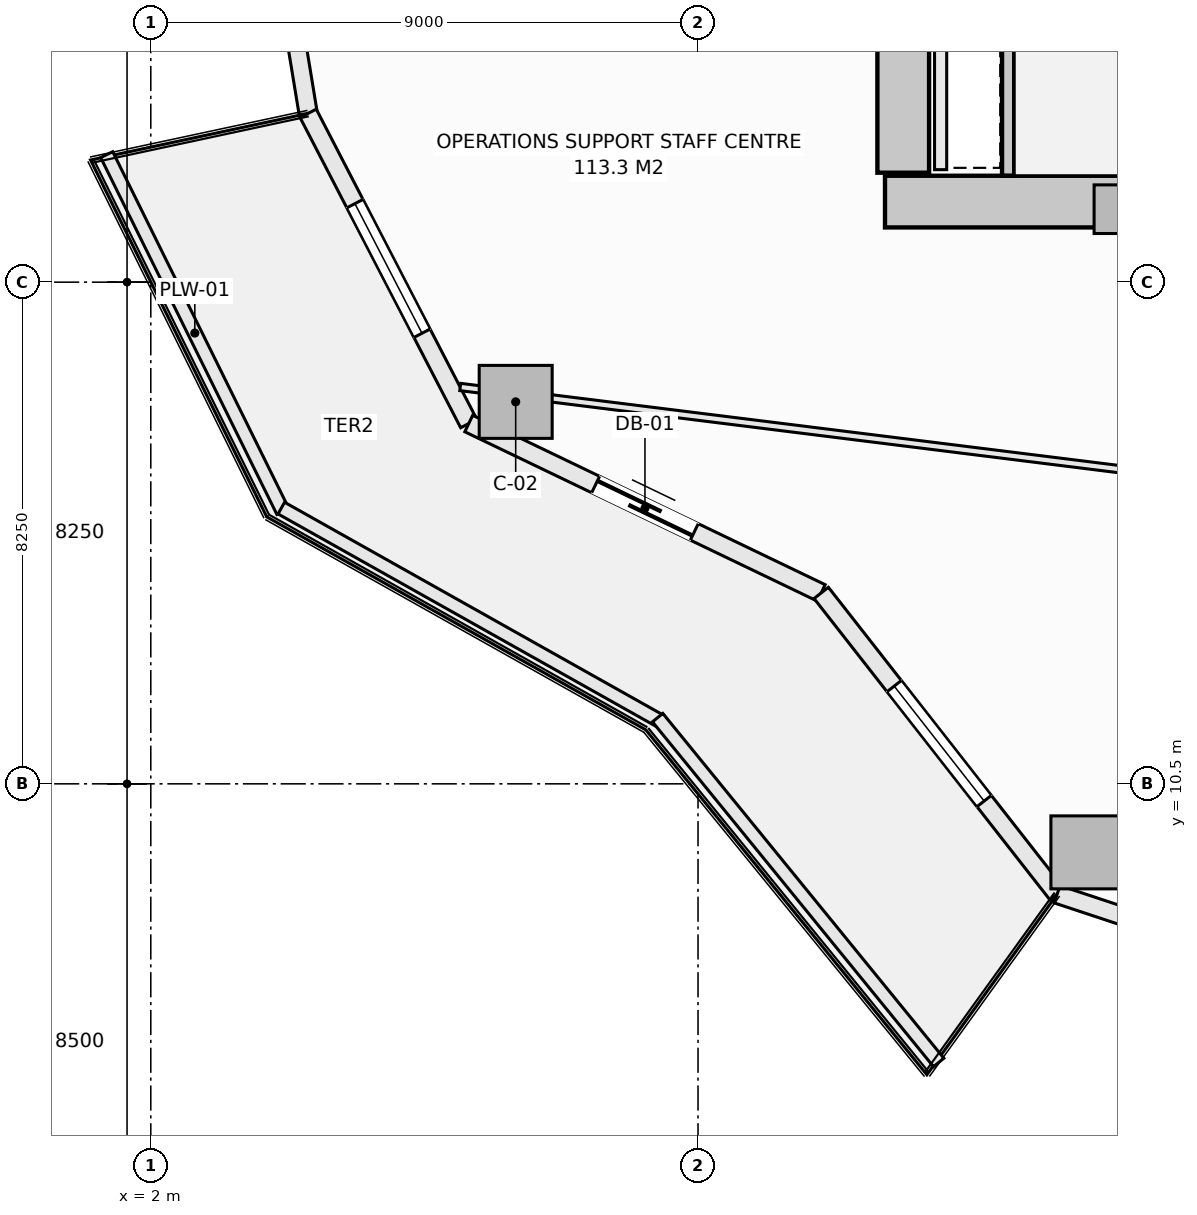
"""IFC4 building model, lengths in metres.
Left out: names, types, materials, properties, quantities, classifications, styles, units other than length and angle.
Written with IfcOpenShell. Run it as: python <this file> out.ifc"""

import sys

from ifc_helpers import new_model, si_unit, direction, frame, frame_2d, origin, origin_2d, place, context, subcontext, project, spatial, rectangle, extrude, element, fill, save


model = new_model("IFC4")
c1 = context("Model", 3, precision=1e-05, world=origin(), true_north=direction((0.0, 1.0)))
c2 = subcontext(c1, "Body", "Model", "MODEL_VIEW")
j1 = project(units=[si_unit("LENGTHUNIT", "METRE"), si_unit("PLANEANGLEUNIT", "RADIAN")], contexts=[c1])
p1 = place(None, origin())
s1 = spatial("IfcSite", under=j1, at=p1, CompositionType="ELEMENT")
p2 = place(p1, origin())
s2 = spatial("IfcBuilding", under=s1, at=p2, CompositionType="ELEMENT")
p3 = place(p2, frame((0.0, 0.0, 80.4)))
s3 = spatial("IfcBuildingStorey", under=s2, at=p3, CompositionType="ELEMENT", Elevation=80.4)
p4 = place(p3, frame((14.075, 20.075, -0.28), z_axis=(0.0, 0.0, 1.0), x_axis=(1.0, 0.0, 0.0)))
e1 = element("IfcWall", 1, at=p4, inside=s3, PredefinedType="SHEAR", context=c2, shape_type="SweptSolid", body=[
    extrude(rectangle(XDim=13.85, YDim=0.85, at=frame_2d((6.925, 0.0))), origin(), (0.0, 0.0, 1.0), 3.85),
])
p5 = place(p3, frame((14.375, 20.55, -0.28), z_axis=(0.0, 0.0, 1.0), x_axis=(0.0, 1.0, 0.0)))
e2 = element("IfcWall", 2, at=p5, inside=s3, PredefinedType="SHEAR", context=c2, shape_type="SweptSolid", body=[
    extrude(rectangle(XDim=12.9, YDim=0.85, at=frame_2d((6.45, 0.0))), origin(), (0.0, 0.0, 1.0), 3.85),
])
for number, where, z_axis, x_axis in (
    (3, (8.001, 16.781, -0.28), (0.0, 0.0, 1.0), (1.0, 0.0, 0.0)),
    (4, (17.404, 9.373, -0.28), (0.0, 0.0, 1.0), (1.0, 0.0, 0.0)),
):
    element("IfcColumn", number, at=place(p3, frame(where, z_axis=z_axis, x_axis=x_axis)), inside=s3, PredefinedType="COLUMN", context=c2, shape_type="SweptSolid", body=[
        extrude(rectangle(XDim=1.2, YDim=1.2, at=origin_2d()), origin(), (0.0, 0.0, 1.0), 3.85),
    ])
p6 = place(p3, frame((17.914, 19.95, -0.28), z_axis=(0.0, 0.0, 1.0), x_axis=(1.0, 0.0, 0.0)))
e5 = element("IfcColumn", 5, at=p6, inside=s3, PredefinedType="PILASTER", context=c2, shape_type="SweptSolid", body=[
    extrude(rectangle(XDim=0.8, YDim=0.8, at=origin_2d()), origin(), (0.0, 0.0, 1.0), 3.85),
])
p7 = place(p3, frame((3.688, 27.0, 0.0), z_axis=(0.0, 0.0, 1.0), x_axis=(0.162386212206, -0.986727276447, 0.0)))
e6 = element("IfcWall", 6, at=p7, inside=s3, PredefinedType="SOLIDWALL", context=c2, shape_type="SweptSolid", body=[
    extrude(rectangle(XDim=5.548, YDim=0.3, at=frame_2d((2.774, 0.0))), origin(), (0.0, 0.0, 1.0), 3.093),
])
p8 = place(p7, frame((2.05, 0.0, 0.85)))
e7 = element("IfcOpeningElement", 7, at=p8, cuts=e6, PredefinedType="OPENING", context=c2, shape_type="SweptSolid", body=[
    extrude(rectangle(XDim=2.4, YDim=1.9, at=frame_2d((1.2, 0.95))), frame((0.0, 0.16, 0.0), z_axis=(0.0, -1.0, 0.0), x_axis=(1.0, 0.0, 0.0)), (0.0, 0.0, 1.0), 0.32),
])
p9 = place(p3, frame((4.588, 21.526, 0.0), z_axis=(0.0, 0.0, 1.0), x_axis=(0.459800981414, -0.888021991558, 0.0)))
e8 = element("IfcWall", 8, at=p9, inside=s3, PredefinedType="SOLIDWALL", context=c2, shape_type="SweptSolid", body=[
    extrude(rectangle(XDim=5.744, YDim=0.3, at=frame_2d((2.872, 0.0))), origin(), (0.0, 0.0, 1.0), 3.093),
])
p10 = place(p9, frame((1.672, 0.0, 0.85)))
e9 = element("IfcOpeningElement", 9, at=p10, cuts=e8, PredefinedType="OPENING", context=c2, shape_type="SweptSolid", body=[
    extrude(rectangle(XDim=2.4, YDim=1.9, at=frame_2d((1.2, 0.95))), frame((0.0, 0.16, 0.0), z_axis=(0.0, -1.0, 0.0), x_axis=(1.0, 0.0, 0.0)), (0.0, 0.0, 1.0), 0.32),
])
p11 = place(p3, frame((7.229, 16.425, 0.0), z_axis=(0.0, 0.0, 1.0), x_axis=(0.901354747727, -0.433081538224, 0.0)))
e10 = element("IfcWall", 10, at=p11, inside=s3, PredefinedType="SOLIDWALL", context=c2, shape_type="SweptSolid", body=[
    extrude(rectangle(XDim=6.431, YDim=0.3, at=frame_2d((3.215, 0.0))), origin(), (0.0, 0.0, 1.0), 3.093),
])
p12 = place(p11, frame((2.315, 0.0, 0.0)))
e11 = element("IfcOpeningElement", 11, at=p12, cuts=e10, PredefinedType="OPENING", context=c2, shape_type="SweptSolid", body=[
    extrude(rectangle(XDim=1.8, YDim=2.25, at=frame_2d((0.9, 1.125))), frame((0.0, 0.16, 0.0), z_axis=(0.0, -1.0, 0.0), x_axis=(1.0, 0.0, 0.0)), (0.0, 0.0, 1.0), 0.32),
])
p13 = place(p3, frame((13.026, 13.64, 0.0), z_axis=(0.0, 0.0, 1.0), x_axis=(0.616434798832, -0.78740595552, 0.0)))
e12 = element("IfcWall", 12, at=p13, inside=s3, PredefinedType="SOLIDWALL", context=c2, shape_type="SweptSolid", body=[
    extrude(rectangle(XDim=6.294, YDim=0.3, at=frame_2d((3.147, 0.0))), origin(), (0.0, 0.0, 1.0), 3.093),
])
p14 = place(p13, frame((1.947, 0.0, 0.85)))
e13 = element("IfcOpeningElement", 13, at=p14, cuts=e12, PredefinedType="OPENING", context=c2, shape_type="SweptSolid", body=[
    extrude(rectangle(XDim=2.4, YDim=1.9, at=frame_2d((1.2, 0.95))), frame((0.0, 0.16, 0.0), z_axis=(0.0, -1.0, 0.0), x_axis=(1.0, 0.0, 0.0)), (0.0, 0.0, 1.0), 0.32),
])
p15 = place(p3, frame((16.906, 8.684, 0.0), z_axis=(0.0, 0.0, 1.0), x_axis=(0.949245153629, -0.314537181127, 0.0)))
e14 = element("IfcWall", 14, at=p15, inside=s3, PredefinedType="SOLIDWALL", context=c2, shape_type="SweptSolid", body=[
    extrude(rectangle(XDim=6.717, YDim=0.3, at=frame_2d((3.358, 0.0))), origin(), (0.0, 0.0, 1.0), 3.093),
])
p16 = place(p15, frame((2.159, 0.0, 0.85)))
e15 = element("IfcOpeningElement", 15, at=p16, cuts=e14, PredefinedType="OPENING", context=c2, shape_type="SweptSolid", body=[
    extrude(rectangle(XDim=2.4, YDim=1.9, at=frame_2d((1.2, 0.95))), frame((0.0, 0.16, 0.0), z_axis=(0.0, -1.0, 0.0), x_axis=(1.0, 0.0, 0.0)), (0.0, 0.0, 1.0), 0.32),
])
p17 = place(p3, frame((1.275, 20.847, 0.0), z_axis=(0.0, 0.0, 1.0), x_axis=(0.442686636348, -0.89667638644, 0.0)))
e16 = element("IfcWall", 16, at=p17, inside=s3, PredefinedType="PARAPET", context=c2, shape_type="SweptSolid", body=[
    extrude(rectangle(XDim=6.545, YDim=0.22, at=frame_2d((3.272, 0.0))), origin(), (0.0, 0.0, 1.0), 0.52),
])
p18 = place(p3, frame((4.147, 15.034, 0.0), z_axis=(0.0, 0.0, 1.0), x_axis=(0.871775109335, -0.489906275468, 0.0)))
e17 = element("IfcWall", 17, at=p18, inside=s3, PredefinedType="PARAPET", context=c2, shape_type="SweptSolid", body=[
    extrude(rectangle(XDim=7.152, YDim=0.22, at=frame_2d((3.576, 0.0))), origin(), (0.0, 0.0, 1.0), 0.52),
])
p19 = place(p3, frame((10.336, 11.589, 0.0), z_axis=(0.0, 0.0, 1.0), x_axis=(0.631819273026, -0.775115737315, 0.0)))
e18 = element("IfcWall", 18, at=p19, inside=s3, PredefinedType="PARAPET", context=c2, shape_type="SweptSolid", body=[
    extrude(rectangle(XDim=7.316, YDim=0.22, at=frame_2d((3.658, 0.0))), origin(), (0.0, 0.0, 1.0), 0.52),
])
p20 = place(p3, frame((16.1, 20.502, -0.28), z_axis=(0.0, 0.0, 1.0), x_axis=(0.0, 1.0, 0.0)))
e19 = element("IfcWall", 19, at=p20, inside=s3, PredefinedType="SHEAR", context=c2, shape_type="SweptSolid", body=[
    extrude(rectangle(XDim=3.036, YDim=0.2, at=frame_2d((1.518, 0.0))), origin(), (0.0, 0.0, 1.0), 3.85),
])
p21 = place(p3, frame((14.99, 20.6, 0.0), z_axis=(0.0, 0.0, 1.0), x_axis=(0.0, 1.0, 0.0)))
e20 = element("IfcWall", 20, at=p21, inside=s3, PredefinedType="SOLIDWALL", context=c2, shape_type="SweptSolid", body=[
    extrude(rectangle(XDim=2.85, YDim=0.2, at=frame_2d((1.425, 0.0))), origin(), (0.0, 0.0, 1.0), 3.57),
])
p22 = place(p3, frame((7.089, 17.026, 0.0), z_axis=(0.0, 0.0, 1.0), x_axis=(0.992316064114, -0.123728852337, 0.0)))
e21 = element("IfcWall", 21, at=p22, inside=s3, PredefinedType="PARTITIONING", context=c2, shape_type="SweptSolid", body=[
    extrude(rectangle(XDim=20.138, YDim=0.12, at=frame_2d((10.069, 0.0))), origin(), (0.0, 0.0, 1.0), 3.205),
])
p23 = place(p10, origin())
e22 = element("IfcWindow", 22, at=p23, inside=s3, PartitioningType="SINGLE_PANEL", PredefinedType="WINDOW", context=c2, shape_type="SweptSolid", body=[
    extrude(rectangle(XDim=2.4, YDim=1.9, at=frame_2d((1.2, 0.95))), frame((0.0, 0.03, 0.0), z_axis=(0.0, -1.0, 0.0), x_axis=(1.0, 0.0, 0.0)), (0.0, 0.0, 1.0), 0.06),
])
fill(e9, e22)
p24 = place(p12, frame((1.8, 0.0, 0.0), z_axis=(0.0, 0.0, 1.0), x_axis=(-1.0, 0.0, 0.0)))
e23 = element("IfcDoor", 23, at=p24, inside=s3, OperationType="SLIDING_TO_LEFT", PredefinedType="DOOR", context=c2, shape_type="SweptSolid", body=[
    extrude(rectangle(XDim=1.8, YDim=2.25, at=frame_2d((0.9, 1.125))), frame((0.0, 0.025, 0.0), z_axis=(0.0, -1.0, 0.0), x_axis=(1.0, 0.0, 0.0)), (0.0, 0.0, 1.0), 0.05),
])
fill(e11, e23)
p25 = place(p14, origin())
e24 = element("IfcWindow", 24, at=p25, inside=s3, PartitioningType="SINGLE_PANEL", PredefinedType="WINDOW", context=c2, shape_type="SweptSolid", body=[
    extrude(rectangle(XDim=2.4, YDim=1.9, at=frame_2d((1.2, 0.95))), frame((0.0, 0.03, 0.0), z_axis=(0.0, -1.0, 0.0), x_axis=(1.0, 0.0, 0.0)), (0.0, 0.0, 1.0), 0.06),
])
fill(e13, e24)
save(model, sys.argv[1])
